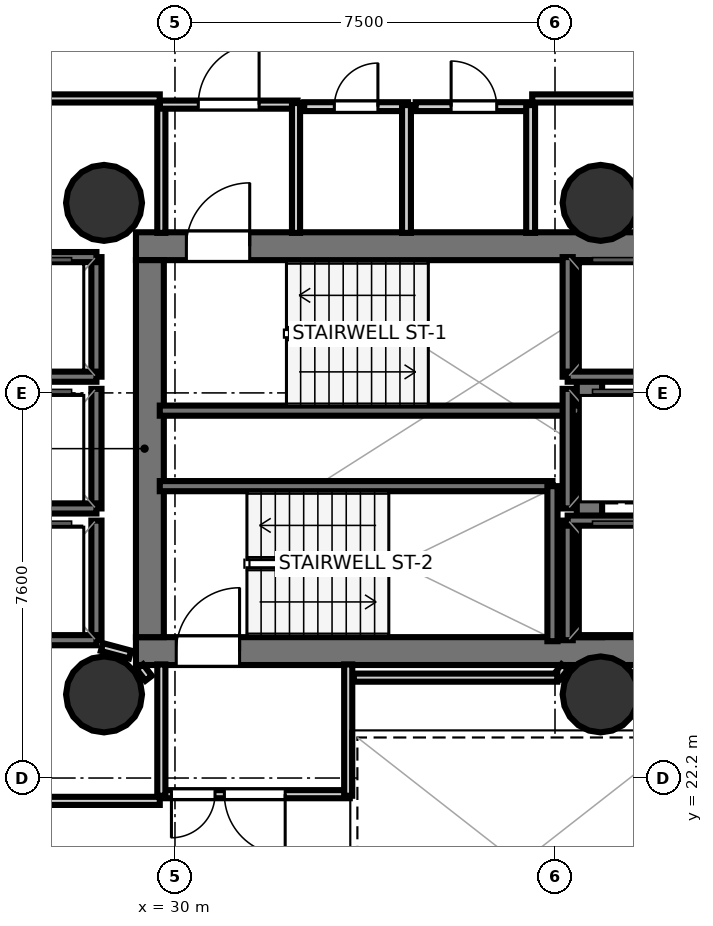
"""IFC4 building model, lengths in metres.
Left out: names, types, materials, properties, quantities, classifications, styles, units other than length and angle.
Written with IfcOpenShell. Run it as: python <this file> out.ifc"""

import sys

from ifc_helpers import new_model, si_unit, direction, frame, frame_2d, origin, origin_2d, place, context, subcontext, project, spatial, rectangle, hollow_circle, extrude, element, fill, save


model = new_model("IFC4")
c1 = context("Model", 3, precision=1e-05, world=origin(), true_north=direction((0.0, 1.0)))
c2 = subcontext(c1, "Body", "Model", "MODEL_VIEW")
j1 = project(units=[si_unit("LENGTHUNIT", "METRE"), si_unit("PLANEANGLEUNIT", "RADIAN")], contexts=[c1])
p1 = place(None, origin())
s1 = spatial("IfcSite", under=j1, at=p1, CompositionType="ELEMENT")
p2 = place(p1, origin())
s2 = spatial("IfcBuilding", under=s1, at=p2, CompositionType="ELEMENT")
p3 = place(p2, frame((0.0, 0.0, 108.9)))
s3 = spatial("IfcBuildingStorey", under=s2, at=p3, CompositionType="ELEMENT", Elevation=108.9)
p4 = place(p3, frame((29.23, 32.695, 0.0), z_axis=(0.0, 0.0, 1.0), x_axis=(1.0, 0.0, 0.0)))
e1 = element("IfcWall", 1, at=p4, inside=s3, PredefinedType="SHEAR", context=c2, shape_type="SweptSolid", body=[
    extrude(rectangle(XDim=10.62, YDim=0.55, at=frame_2d((5.31, 0.0))), origin(), (0.0, 0.0, 1.0), 3.52),
])
p5 = place(p4, frame((0.995, 0.0, 0.0)))
e2 = element("IfcOpeningElement", 2, at=p5, cuts=e1, PredefinedType="OPENING", context=c2, shape_type="SweptSolid", body=[
    extrude(rectangle(XDim=1.25, YDim=2.15, at=frame_2d((0.625, 1.075))), frame((0.0, 0.285, 0.0), z_axis=(0.0, -1.0, 0.0), x_axis=(1.0, 0.0, 0.0)), (0.0, 0.0, 1.0), 0.57),
])
p6 = place(p3, frame((29.23, 24.705, 0.0), z_axis=(0.0, 0.0, 1.0), x_axis=(1.0, 0.0, 0.0)))
e3 = element("IfcWall", 3, at=p6, inside=s3, PredefinedType="SHEAR", context=c2, shape_type="SweptSolid", body=[
    extrude(rectangle(XDim=10.62, YDim=0.55, at=frame_2d((5.31, 0.0))), origin(), (0.0, 0.0, 1.0), 3.52),
])
p7 = place(p6, frame((0.795, 0.0, 0.0)))
e4 = element("IfcOpeningElement", 4, at=p7, cuts=e3, PredefinedType="OPENING", context=c2, shape_type="SweptSolid", body=[
    extrude(rectangle(XDim=1.25, YDim=2.15, at=frame_2d((0.625, 1.075))), frame((0.0, 0.285, 0.0), z_axis=(0.0, -1.0, 0.0), x_axis=(1.0, 0.0, 0.0)), (0.0, 0.0, 1.0), 0.57),
])
p8 = place(p3, frame((29.505, 24.98, 0.0), z_axis=(0.0, 0.0, 1.0), x_axis=(0.0, 1.0, 0.0)))
e5 = element("IfcWall", 5, at=p8, inside=s3, PredefinedType="SHEAR", context=c2, shape_type="SweptSolid", body=[
    extrude(rectangle(XDim=7.44, YDim=0.55, at=frame_2d((3.72, 0.0))), origin(), (0.0, 0.0, 1.0), 3.52),
])
p9 = place(p3, frame((38.18, 24.98, 0.0), z_axis=(0.0, 0.0, 1.0), x_axis=(0.0, 1.0, 0.0)))
e6 = element("IfcWall", 6, at=p9, inside=s3, PredefinedType="SHEAR", context=c2, shape_type="SweptSolid", body=[
    extrude(rectangle(XDim=7.44, YDim=0.5, at=frame_2d((3.72, 0.0))), origin(), (0.0, 0.0, 1.0), 3.52),
])
for number, where, z_axis, x_axis in (
    (7, (28.6, 33.55, 0.0), (0.0, 0.0, 1.0), (1.0, 0.0, 0.0)),
    (8, (28.6, 23.85, 0.0), (0.0, 0.0, 1.0), (1.0, 0.0, 0.0)),
    (9, (38.4, 33.55, 0.0), (0.0, 0.0, 1.0), (1.0, 0.0, 0.0)),
    (10, (38.4, 23.85, 0.0), (0.0, 0.0, 1.0), (1.0, 0.0, 0.0)),
):
    element("IfcColumn", number, at=place(p3, frame(where, z_axis=z_axis, x_axis=x_axis)), inside=s3, PredefinedType="COLUMN", context=c2, shape_type="SweptSolid", body=[
        extrude(hollow_circle(Radius=0.75, WallThickness=0.036, at=origin_2d()), origin(), (0.0, 0.0, 1.0), 3.7),
    ])
p10 = place(p3, frame((29.7, 29.45, 0.0), z_axis=(0.0, 0.0, 1.0), x_axis=(1.0, 0.0, 0.0)))
e11 = element("IfcWall", 11, at=p10, inside=s3, PredefinedType="SOLIDWALL", context=c2, shape_type="SweptSolid", body=[
    extrude(rectangle(XDim=8.3, YDim=0.2, at=frame_2d((4.15, 0.0))), origin(), (0.0, 0.0, 1.0), 3.52),
])
p11 = place(p3, frame((29.7, 27.96, 0.0), z_axis=(0.0, 0.0, 1.0), x_axis=(1.0, 0.0, 0.0)))
e12 = element("IfcWall", 12, at=p11, inside=s3, PredefinedType="SOLIDWALL", context=c2, shape_type="SweptSolid", body=[
    extrude(rectangle(XDim=7.75, YDim=0.2, at=frame_2d((3.875, 0.0))), origin(), (0.0, 0.0, 1.0), 3.52),
])
p12 = place(p3, frame((37.45, 24.9, 0.0), z_axis=(0.0, 0.0, 1.0), x_axis=(0.0, 1.0, 0.0)))
e13 = element("IfcWall", 13, at=p12, inside=s3, PredefinedType="SOLIDWALL", context=c2, shape_type="SweptSolid", body=[
    extrude(rectangle(XDim=3.06, YDim=0.2, at=frame_2d((1.53, 0.0))), origin(), (0.0, 0.0, 1.0), 3.52),
])
p13 = place(p3, frame((37.75, 30.12, 0.0), z_axis=(0.0, 0.0, 1.0), x_axis=(0.0, 1.0, 0.0)))
e14 = element("IfcWall", 14, at=p13, inside=s3, PredefinedType="SOLIDWALL", context=c2, shape_type="SweptSolid", body=[
    extrude(rectangle(XDim=2.36, YDim=0.2, at=frame_2d((1.18, 0.0))), origin(), (0.0, 0.0, 1.0), 3.52),
])
p14 = place(p3, frame((37.75, 30.12, 0.0), z_axis=(0.0, 0.0, 1.0), x_axis=(1.0, 0.0, 0.0)))
e15 = element("IfcWall", 15, at=p14, inside=s3, PredefinedType="SOLIDWALL", context=c2, shape_type="SweptSolid", body=[
    extrude(rectangle(XDim=2.1, YDim=0.2, at=frame_2d((1.05, 0.0))), origin(), (0.0, 0.0, 1.0), 3.52),
])
p15 = place(p3, frame((37.75, 24.92, 0.0), z_axis=(0.0, 0.0, 1.0), x_axis=(0.0, 1.0, 0.0)))
e16 = element("IfcWall", 16, at=p15, inside=s3, PredefinedType="SOLIDWALL", context=c2, shape_type="SweptSolid", body=[
    extrude(rectangle(XDim=2.36, YDim=0.2, at=frame_2d((1.18, 0.0))), origin(), (0.0, 0.0, 1.0), 3.52),
])
p16 = place(p3, frame((37.75, 27.28, 0.0), z_axis=(0.0, 0.0, 1.0), x_axis=(1.0, 0.0, 0.0)))
e17 = element("IfcWall", 17, at=p16, inside=s3, PredefinedType="SOLIDWALL", context=c2, shape_type="SweptSolid", body=[
    extrude(rectangle(XDim=2.1, YDim=0.2, at=frame_2d((1.05, 0.0))), origin(), (0.0, 0.0, 1.0), 3.52),
])
p17 = place(p3, frame((28.45, 30.12, 0.0), z_axis=(0.0, 0.0, 1.0), x_axis=(0.0, 1.0, 0.0)))
e18 = element("IfcWall", 18, at=p17, inside=s3, PredefinedType="SOLIDWALL", context=c2, shape_type="SweptSolid", body=[
    extrude(rectangle(XDim=2.36, YDim=0.2, at=frame_2d((1.18, 0.0))), origin(), (0.0, 0.0, 1.0), 3.52),
])
for number, where, z_axis, x_axis in (
    (19, (26.35, 32.48, 0.0), (0.0, 0.0, 1.0), (1.0, 0.0, 0.0)),
    (20, (26.35, 30.12, 0.0), (0.0, 0.0, 1.0), (1.0, 0.0, 0.0)),
):
    element("IfcWall", number, at=place(p3, frame(where, z_axis=z_axis, x_axis=x_axis)), inside=s3, PredefinedType="SOLIDWALL", context=c2, shape_type="SweptSolid", body=[
        extrude(rectangle(XDim=2.1, YDim=0.2, at=frame_2d((1.05, 0.0))), origin(), (0.0, 0.0, 1.0), 3.52),
    ])
p18 = place(p3, frame((28.45, 27.52, 0.0), z_axis=(0.0, 0.0, 1.0), x_axis=(0.0, 1.0, 0.0)))
e21 = element("IfcWall", 21, at=p18, inside=s3, PredefinedType="SOLIDWALL", context=c2, shape_type="SweptSolid", body=[
    extrude(rectangle(XDim=2.36, YDim=0.2, at=frame_2d((1.18, 0.0))), origin(), (0.0, 0.0, 1.0), 3.52),
])
p19 = place(p3, frame((26.35, 27.52, 0.0), z_axis=(0.0, 0.0, 1.0), x_axis=(1.0, 0.0, 0.0)))
e22 = element("IfcWall", 22, at=p19, inside=s3, PredefinedType="SOLIDWALL", context=c2, shape_type="SweptSolid", body=[
    extrude(rectangle(XDim=2.1, YDim=0.2, at=frame_2d((1.05, 0.0))), origin(), (0.0, 0.0, 1.0), 3.52),
])
p20 = place(p3, frame((28.45, 24.92, 0.0), z_axis=(0.0, 0.0, 1.0), x_axis=(0.0, 1.0, 0.0)))
e23 = element("IfcWall", 23, at=p20, inside=s3, PredefinedType="SOLIDWALL", context=c2, shape_type="SweptSolid", body=[
    extrude(rectangle(XDim=2.36, YDim=0.2, at=frame_2d((1.18, 0.0))), origin(), (0.0, 0.0, 1.0), 3.52),
])
p21 = place(p3, frame((26.35, 24.92, 0.0), z_axis=(0.0, 0.0, 1.0), x_axis=(1.0, 0.0, 0.0)))
e24 = element("IfcWall", 24, at=p21, inside=s3, PredefinedType="SOLIDWALL", context=c2, shape_type="SweptSolid", body=[
    extrude(rectangle(XDim=2.1, YDim=0.2, at=frame_2d((1.05, 0.0))), origin(), (0.0, 0.0, 1.0), 3.52),
])
p22 = place(p3, frame((37.75, 27.52, 0.0), z_axis=(0.0, 0.0, 1.0), x_axis=(0.0, 1.0, 0.0)))
e25 = element("IfcWall", 25, at=p22, inside=s3, PredefinedType="SOLIDWALL", context=c2, shape_type="SweptSolid", body=[
    extrude(rectangle(XDim=2.36, YDim=0.2, at=frame_2d((1.18, 0.0))), origin(), (0.0, 0.0, 1.0), 3.52),
])
p23 = place(p3, frame((29.731, 32.958, 0.0), z_axis=(0.0, 0.0, 1.0), x_axis=(0.0, 1.0, 0.0)))
e26 = element("IfcWall", 26, at=p23, inside=s3, PredefinedType="PARTITIONING", context=c2, shape_type="SweptSolid", body=[
    extrude(rectangle(XDim=2.562, YDim=0.16, at=frame_2d((1.281, 0.0))), origin(), (0.0, 0.0, 1.0), 2.84),
])
p24 = place(p3, frame((29.7, 35.489, 0.0), z_axis=(0.0, 0.0, 1.0), x_axis=(1.0, 0.0, 0.0)))
e27 = element("IfcWall", 27, at=p24, inside=s3, PredefinedType="PARTITIONING", context=c2, shape_type="SweptSolid", body=[
    extrude(rectangle(XDim=2.72, YDim=0.16, at=frame_2d((1.36, 0.0))), origin(), (0.0, 0.0, 1.0), 2.84),
])
p25 = place(p24, frame((0.76, 0.0, 0.0)))
e28 = element("IfcOpeningElement", 28, at=p25, cuts=e27, PredefinedType="OPENING", context=c2, shape_type="SweptSolid", body=[
    extrude(rectangle(XDim=1.2, YDim=2.15, at=frame_2d((0.6, 1.075))), frame((0.0, 0.09, 0.0), z_axis=(0.0, -1.0, 0.0), x_axis=(1.0, 0.0, 0.0)), (0.0, 0.0, 1.0), 0.18),
])
p26 = place(p3, frame((32.389, 35.52, 0.0), z_axis=(0.0, 0.0, 1.0), x_axis=(0.0, -1.0, 0.0)))
e29 = element("IfcWall", 29, at=p26, inside=s3, PredefinedType="PARTITIONING", context=c2, shape_type="SweptSolid", body=[
    extrude(rectangle(XDim=2.562, YDim=0.16, at=frame_2d((1.281, 0.0))), origin(), (0.0, 0.0, 1.0), 2.84),
])
p27 = place(p3, frame((33.45, 21.881, 0.0), z_axis=(0.0, 0.0, 1.0), x_axis=(-1.0, 0.0, 0.0)))
e30 = element("IfcWall", 30, at=p27, inside=s3, PredefinedType="PARTITIONING", context=c2, shape_type="SweptSolid", body=[
    extrude(rectangle(XDim=3.75, YDim=0.16, at=frame_2d((1.875, 0.0))), origin(), (0.0, 0.0, 1.0), 2.84),
])
p28 = place(p27, frame((1.275, 0.0, 0.0)))
e31 = element("IfcOpeningElement", 31, at=p28, cuts=e30, PredefinedType="OPENING", context=c2, shape_type="SweptSolid", body=[
    extrude(rectangle(XDim=1.2, YDim=2.15, at=frame_2d((0.6, 1.075))), frame((0.0, 0.09, 0.0), z_axis=(0.0, -1.0, 0.0), x_axis=(1.0, 0.0, 0.0)), (0.0, 0.0, 1.0), 0.18),
])
p29 = place(p27, frame((2.66, 0.0, 0.0)))
e32 = element("IfcOpeningElement", 32, at=p29, cuts=e30, PredefinedType="OPENING", context=c2, shape_type="SweptSolid", body=[
    extrude(rectangle(XDim=0.86, YDim=2.05, at=frame_2d((0.43, 1.025))), frame((0.0, 0.09, 0.0), z_axis=(0.0, -1.0, 0.0), x_axis=(1.0, 0.0, 0.0)), (0.0, 0.0, 1.0), 0.18),
])
for number, where, z_axis, x_axis in (
    (33, (29.731, 21.85, 0.0), (0.0, 0.0, 1.0), (0.0, 1.0, 0.0)),
    (34, (33.419, 24.442, 0.0), (0.0, 0.0, 1.0), (0.0, -1.0, 0.0)),
):
    element("IfcWall", number, at=place(p3, frame(where, z_axis=z_axis, x_axis=x_axis)), inside=s3, PredefinedType="PARTITIONING", context=c2, shape_type="SweptSolid", body=[
        extrude(rectangle(XDim=2.592, YDim=0.16, at=frame_2d((1.296, 0.0))), origin(), (0.0, 0.0, 1.0), 2.84),
    ])
p30 = place(p3, frame((32.55, 35.449, 0.0), z_axis=(0.0, 0.0, 1.0), x_axis=(1.0, 0.0, 0.0)))
e35 = element("IfcWall", 35, at=p30, inside=s3, PredefinedType="PLUMBINGWALL", context=c2, shape_type="SweptSolid", body=[
    extrude(rectangle(XDim=2.05, YDim=0.175, at=frame_2d((1.025, 0.0))), origin(), (0.0, 0.0, 1.0), 2.84),
])
p31 = place(p30, frame((0.595, 0.0, 0.0)))
e36 = element("IfcOpeningElement", 36, at=p31, cuts=e35, PredefinedType="OPENING", context=c2, shape_type="SweptSolid", body=[
    extrude(rectangle(XDim=0.86, YDim=2.05, at=frame_2d((0.43, 1.025))), frame((0.0, 0.097, 0.0), z_axis=(0.0, -1.0, 0.0), x_axis=(1.0, 0.0, 0.0)), (0.0, 0.0, 1.0), 0.195),
])
p32 = place(p3, frame((34.569, 35.48, 0.0), z_axis=(0.0, 0.0, 1.0), x_axis=(0.0, -1.0, 0.0)))
e37 = element("IfcWall", 37, at=p32, inside=s3, PredefinedType="PLUMBINGWALL", context=c2, shape_type="SweptSolid", body=[
    extrude(rectangle(XDim=2.522, YDim=0.175, at=frame_2d((1.261, 0.0))), origin(), (0.0, 0.0, 1.0), 2.84),
])
p33 = place(p3, frame((34.75, 35.449, 0.0), z_axis=(0.0, 0.0, 1.0), x_axis=(1.0, 0.0, 0.0)))
e38 = element("IfcWall", 38, at=p33, inside=s3, PredefinedType="PLUMBINGWALL", context=c2, shape_type="SweptSolid", body=[
    extrude(rectangle(XDim=2.3, YDim=0.175, at=frame_2d((1.15, 0.0))), origin(), (0.0, 0.0, 1.0), 2.84),
])
p34 = place(p33, frame((0.7, 0.0, 0.0)))
e39 = element("IfcOpeningElement", 39, at=p34, cuts=e38, PredefinedType="OPENING", context=c2, shape_type="SweptSolid", body=[
    extrude(rectangle(XDim=0.9, YDim=2.1, at=frame_2d((0.45, 1.05))), frame((0.0, 0.097, 0.0), z_axis=(0.0, -1.0, 0.0), x_axis=(1.0, 0.0, 0.0)), (0.0, 0.0, 1.0), 0.195),
])
p35 = place(p3, frame((37.019, 35.48, 0.0), z_axis=(0.0, 0.0, 1.0), x_axis=(0.0, -1.0, 0.0)))
e40 = element("IfcWall", 40, at=p35, inside=s3, PredefinedType="PLUMBINGWALL", context=c2, shape_type="SweptSolid", body=[
    extrude(rectangle(XDim=2.522, YDim=0.175, at=frame_2d((1.261, 0.0))), origin(), (0.0, 0.0, 1.0), 2.84),
])
p36 = place(p3, frame((29.48, 24.169, 0.0), z_axis=(0.0, 0.0, 1.0), x_axis=(-0.607608252226, 0.794236873878, 0.0)))
e41 = element("IfcWall", 41, at=p36, inside=s3, PredefinedType="PARTITIONING", context=c2, shape_type="SweptSolid", body=[
    extrude(rectangle(XDim=0.286, YDim=0.16, at=frame_2d((0.143, 0.0))), origin(), (0.0, 0.0, 1.0), 2.84),
])
p37 = place(p3, frame((29.114, 24.637, 0.0), z_axis=(0.0, 0.0, 1.0), x_axis=(-0.966199685486, 0.257794817183, 0.0)))
e42 = element("IfcWall", 42, at=p37, inside=s3, PredefinedType="PARTITIONING", context=c2, shape_type="SweptSolid", body=[
    extrude(rectangle(XDim=0.575, YDim=0.16, at=frame_2d((0.288, 0.0))), origin(), (0.0, 0.0, 1.0), 2.84),
])
p38 = place(p3, frame((37.694, 24.396, 0.0), z_axis=(0.0, 0.0, 1.0), x_axis=(-0.607118658061, -0.794611184815, 0.0)))
e43 = element("IfcWall", 43, at=p38, inside=s3, PredefinedType="PARTITIONING", context=c2, shape_type="SweptSolid", body=[
    extrude(rectangle(XDim=0.246, YDim=0.16, at=frame_2d((0.123, 0.0))), origin(), (0.0, 0.0, 1.0), 2.84),
])
p39 = place(p3, frame((37.545, 24.181, 0.0), z_axis=(0.0, 0.0, 1.0), x_axis=(-1.0, 0.0, 0.0)))
e44 = element("IfcWall", 44, at=p39, inside=s3, PredefinedType="PARTITIONING", context=c2, shape_type="SweptSolid", body=[
    extrude(rectangle(XDim=4.015, YDim=0.16, at=frame_2d((2.007, 0.0))), origin(), (0.0, 0.0, 1.0), 2.84),
])
p40 = place(p3, frame((39.818, 35.611, 0.0), z_axis=(0.0, 0.0, 1.0), x_axis=(-1.0, 0.0, 0.0)))
e45 = element("IfcWall", 45, at=p40, inside=s3, PredefinedType="PARTITIONING", context=c2, shape_type="SweptSolid", body=[
    extrude(rectangle(XDim=2.768, YDim=0.16, at=frame_2d((1.384, 0.0))), origin(), (0.0, 0.0, 1.0), 2.84),
])
for number, where, z_axis, x_axis in (
    (46, (29.7, 35.611, 0.0), (0.0, 0.0, 1.0), (-1.0, 0.0, 0.0)),
    (47, (26.42, 21.749, 0.0), (0.0, 0.0, 1.0), (1.0, 0.0, 0.0)),
):
    element("IfcWall", number, at=place(p3, frame(where, z_axis=z_axis, x_axis=x_axis)), inside=s3, PredefinedType="PARTITIONING", context=c2, shape_type="SweptSolid", body=[
        extrude(rectangle(XDim=3.28, YDim=0.16, at=frame_2d((1.64, 0.0))), origin(), (0.0, 0.0, 1.0), 2.84),
    ])
p41 = place(p5, origin())
e48 = element("IfcDoor", 48, at=p41, inside=s3, OperationType="SINGLE_SWING_RIGHT", PredefinedType="DOOR", context=c2, shape_type="SweptSolid", body=[
    extrude(rectangle(XDim=1.25, YDim=2.15, at=frame_2d((0.625, 1.075))), frame((0.0, 0.025, 0.0), z_axis=(0.0, -1.0, 0.0), x_axis=(1.0, 0.0, 0.0)), (0.0, 0.0, 1.0), 0.05),
])
fill(e2, e48)
p42 = place(p7, origin())
e49 = element("IfcDoor", 49, at=p42, inside=s3, OperationType="SINGLE_SWING_RIGHT", PredefinedType="DOOR", context=c2, shape_type="SweptSolid", body=[
    extrude(rectangle(XDim=1.25, YDim=2.15, at=frame_2d((0.625, 1.075))), frame((0.0, 0.025, 0.0), z_axis=(0.0, -1.0, 0.0), x_axis=(1.0, 0.0, 0.0)), (0.0, 0.0, 1.0), 0.05),
])
fill(e4, e49)
p43 = place(p25, origin())
e50 = element("IfcDoor", 50, at=p43, inside=s3, OperationType="SINGLE_SWING_RIGHT", PredefinedType="DOOR", context=c2, shape_type="SweptSolid", body=[
    extrude(rectangle(XDim=1.2, YDim=2.15, at=frame_2d((0.6, 1.075))), frame((0.0, 0.025, 0.0), z_axis=(0.0, -1.0, 0.0), x_axis=(1.0, 0.0, 0.0)), (0.0, 0.0, 1.0), 0.05),
])
fill(e28, e50)
p44 = place(p28, origin())
e51 = element("IfcDoor", 51, at=p44, inside=s3, OperationType="SINGLE_SWING_LEFT", PredefinedType="DOOR", context=c2, shape_type="SweptSolid", body=[
    extrude(rectangle(XDim=1.2, YDim=2.15, at=frame_2d((0.6, 1.075))), frame((0.0, 0.025, 0.0), z_axis=(0.0, -1.0, 0.0), x_axis=(1.0, 0.0, 0.0)), (0.0, 0.0, 1.0), 0.05),
])
fill(e31, e51)
p45 = place(p31, origin())
e52 = element("IfcDoor", 52, at=p45, inside=s3, OperationType="SINGLE_SWING_RIGHT", PredefinedType="DOOR", context=c2, shape_type="SweptSolid", body=[
    extrude(rectangle(XDim=0.86, YDim=2.05, at=frame_2d((0.43, 1.025))), frame((0.0, 0.025, 0.0), z_axis=(0.0, -1.0, 0.0), x_axis=(1.0, 0.0, 0.0)), (0.0, 0.0, 1.0), 0.05),
])
fill(e36, e52)
p46 = place(p34, origin())
e53 = element("IfcDoor", 53, at=p46, inside=s3, OperationType="SINGLE_SWING_LEFT", PredefinedType="DOOR", context=c2, shape_type="SweptSolid", body=[
    extrude(rectangle(XDim=0.9, YDim=2.1, at=frame_2d((0.45, 1.05))), frame((0.0, 0.025, 0.0), z_axis=(0.0, -1.0, 0.0), x_axis=(1.0, 0.0, 0.0)), (0.0, 0.0, 1.0), 0.05),
])
fill(e39, e53)
p47 = place(p29, origin())
e54 = element("IfcDoor", 54, at=p47, inside=s3, OperationType="SINGLE_SWING_RIGHT", PredefinedType="DOOR", context=c2, shape_type="SweptSolid", body=[
    extrude(rectangle(XDim=0.86, YDim=2.05, at=frame_2d((0.43, 1.025))), frame((0.0, 0.025, 0.0), z_axis=(0.0, -1.0, 0.0), x_axis=(1.0, 0.0, 0.0)), (0.0, 0.0, 1.0), 0.05),
])
fill(e32, e54)
save(model, sys.argv[1])
